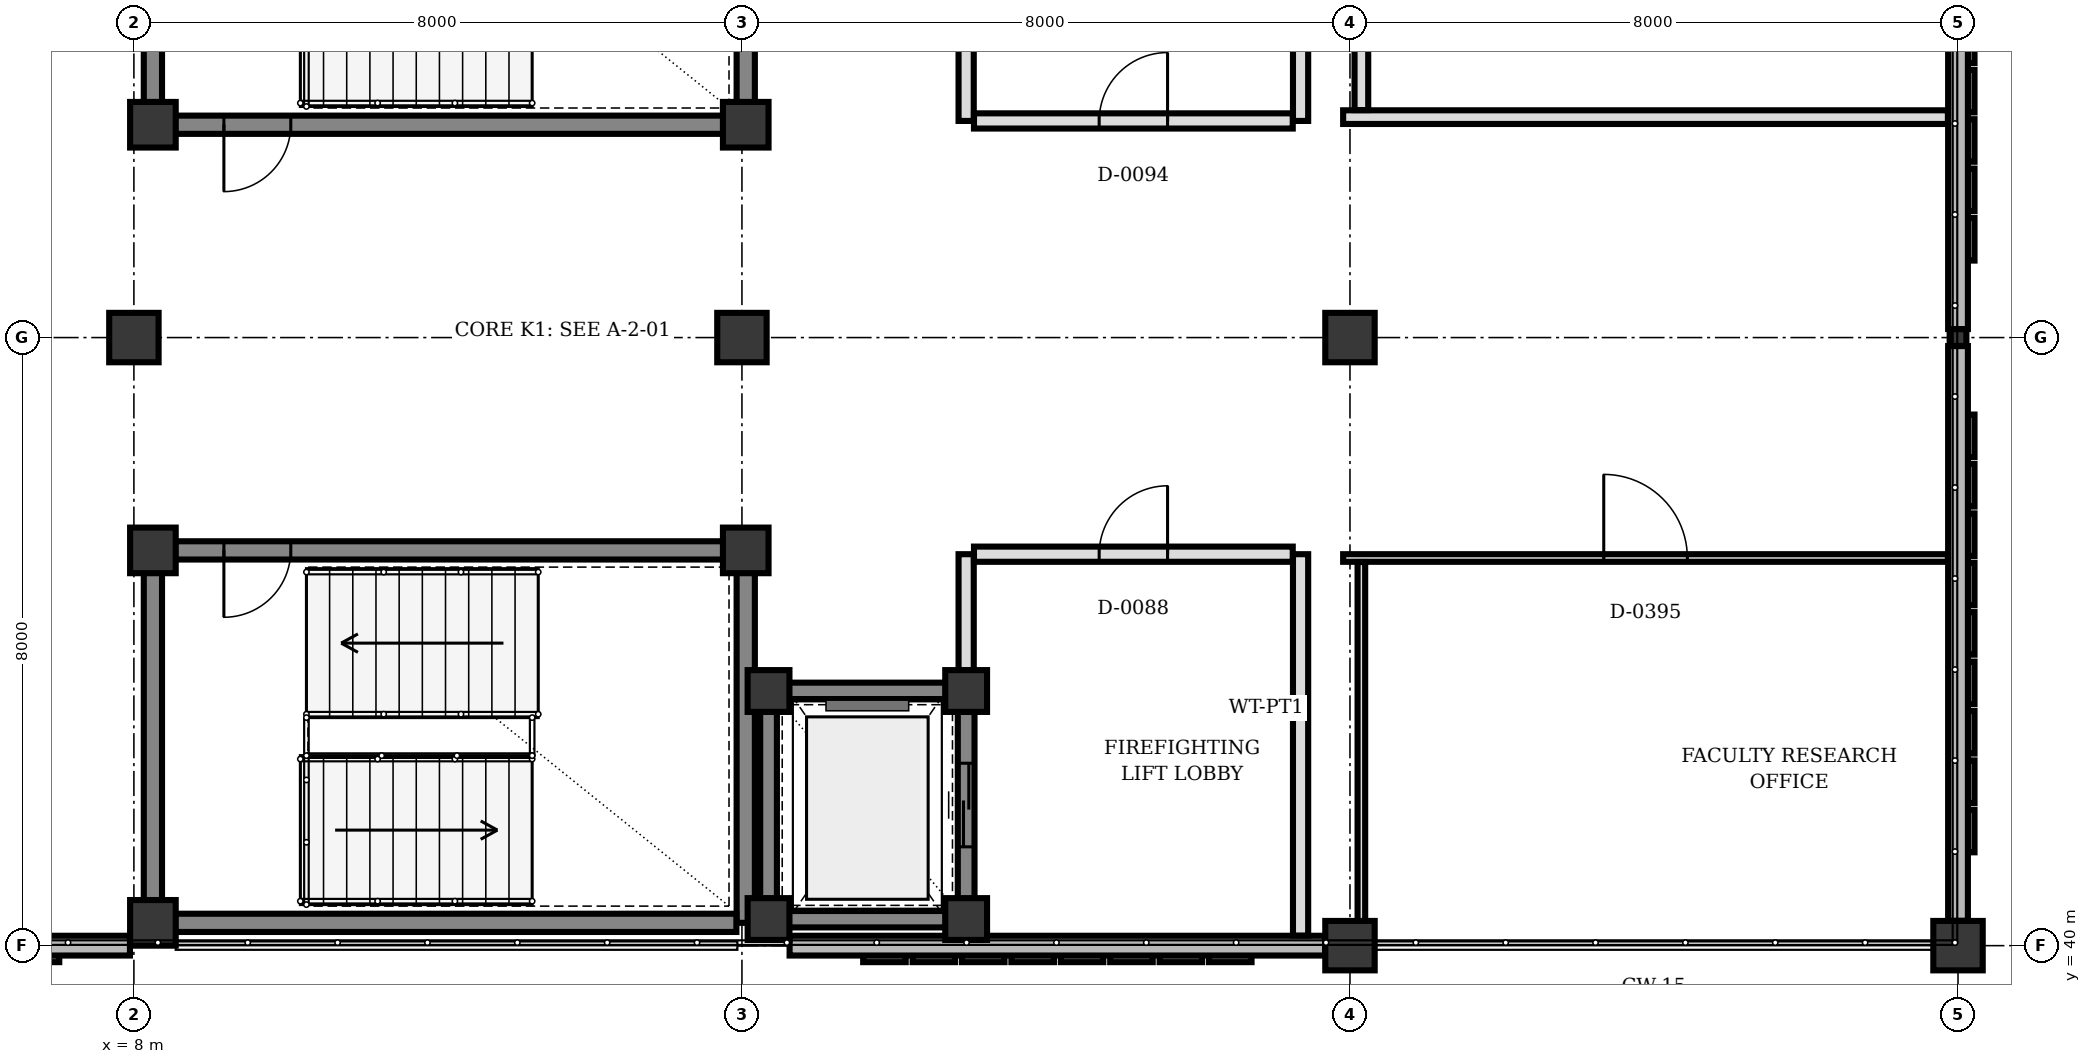
"""IFC4 building model, lengths in metres.
Left out: names, types, materials, properties, quantities, classifications, styles, units other than length and angle.
Written with IfcOpenShell. Run it as: python <this file> out.ifc"""

import sys

from ifc_helpers import new_model, si_unit, direction, frame, frame_2d, origin, origin_2d, place, context, subcontext, project, spatial, rectangle, hollow_rectangle, extrude, element, fill, save


model = new_model("IFC4")
c1 = context("Model", 3, precision=1e-05, world=origin(), true_north=direction((0.0, 1.0)))
c2 = subcontext(c1, "Body", "Model", "MODEL_VIEW")
j1 = project(units=[si_unit("LENGTHUNIT", "METRE"), si_unit("PLANEANGLEUNIT", "RADIAN")], contexts=[c1])
p1 = place(None, origin())
s1 = spatial("IfcSite", under=j1, at=p1, CompositionType="ELEMENT")
p2 = place(p1, origin())
s2 = spatial("IfcBuilding", under=s1, at=p2, CompositionType="ELEMENT")
p3 = place(p2, frame((0.0, 0.0, 12.5)))
s3 = spatial("IfcBuildingStorey", under=s2, at=p3, CompositionType="ELEMENT", Elevation=12.5)
for number, where, z_axis, x_axis in (
    (1, (8.25, 40.3, 0.0), (0.0, 0.0, 1.0), (1.0, 0.0, 0.0)),
    (2, (16.05, 45.2, 0.0), (0.0, 0.0, 1.0), (1.0, 0.0, 0.0)),
    (3, (8.25, 45.2, 0.0), (0.0, 0.0, 1.0), (1.0, 0.0, 0.0)),
    (4, (8.25, 50.8, 0.0), (0.0, 0.0, 1.0), (1.0, 0.0, 0.0)),
    (5, (16.05, 50.8, 0.0), (0.0, 0.0, 1.0), (1.0, 0.0, 0.0)),
):
    element("IfcColumn", number, at=place(p3, frame(where, z_axis=z_axis, x_axis=x_axis)), inside=s3, PredefinedType="COLUMN", context=c2, shape_type="SweptSolid", body=[
        extrude(rectangle(XDim=0.6, YDim=0.6, at=origin_2d()), origin(), (0.0, 0.0, 1.0), 4.0),
    ])
for number, where, z_axis, x_axis in (
    (6, (16.35, 40.35, 0.0), (0.0, 0.0, 1.0), (1.0, 0.0, 0.0)),
    (7, (18.95, 40.35, 0.0), (0.0, 0.0, 1.0), (1.0, 0.0, 0.0)),
    (8, (18.95, 43.35, 0.0), (0.0, 0.0, 1.0), (1.0, 0.0, 0.0)),
    (9, (16.35, 43.35, 0.0), (0.0, 0.0, 1.0), (1.0, 0.0, 0.0)),
):
    element("IfcColumn", number, at=place(p3, frame(where, z_axis=z_axis, x_axis=x_axis)), inside=s3, PredefinedType="COLUMN", context=c2, shape_type="SweptSolid", body=[
        extrude(rectangle(XDim=0.55, YDim=0.55, at=origin_2d()), origin(), (0.0, 0.0, 1.0), 4.0),
    ])
for number, where, z_axis, x_axis in (
    (10, (16.0, 48.0, 0.0), (0.0, 0.0, 1.0), (1.0, 0.0, 0.0)),
    (11, (24.0, 40.0, 0.0), (0.0, 0.0, 1.0), (1.0, 0.0, 0.0)),
    (12, (24.0, 48.0, 0.0), (0.0, 0.0, 1.0), (1.0, 0.0, 0.0)),
    (13, (32.0, 40.0, 0.0), (0.0, 0.0, 1.0), (1.0, 0.0, 0.0)),
):
    element("IfcColumn", number, at=place(p3, frame(where, z_axis=z_axis, x_axis=x_axis)), inside=s3, PredefinedType="COLUMN", context=c2, shape_type="SweptSolid", body=[
        extrude(rectangle(XDim=0.65, YDim=0.65, at=origin_2d()), origin(), (0.0, 0.0, 1.0), 4.0),
    ])
p4 = place(p3, frame((32.0, 48.0, 0.0), z_axis=(0.0, 0.0, 1.0), x_axis=(1.0, 0.0, 0.0)))
e14 = element("IfcColumn", 14, at=p4, inside=s3, PredefinedType="COLUMN", context=c2, shape_type="SweptSolid", body=[
    extrude(hollow_rectangle(XDim=0.22, YDim=0.22, WallThickness=0.01, at=origin_2d()), origin(), (0.0, 0.0, 1.0), 4.0),
])
p5 = place(p3, frame((8.0, 48.0, 0.0), z_axis=(0.0, 0.0, 1.0), x_axis=(1.0, 0.0, 0.0)))
e15 = element("IfcColumn", 15, at=p5, inside=s3, PredefinedType="COLUMN", context=c2, shape_type="SweptSolid", body=[
    extrude(rectangle(XDim=0.65, YDim=0.65, at=origin_2d()), origin(), (0.0, 0.0, 1.0), 4.0),
])
for number, where, z_axis, x_axis in (
    (16, (32.0, 55.673, 0.0), (0.0, 0.0, 1.0), (0.0, -1.0, 0.0)),
    (17, (32.0, 47.888, 0.0), (0.0, 0.0, 1.0), (0.0, -1.0, 0.0)),
):
    element("IfcWall", number, at=place(p3, frame(where, z_axis=z_axis, x_axis=x_axis)), inside=s3, PredefinedType="SOLIDWALL", context=c2, shape_type="SweptSolid", body=[
        extrude(rectangle(XDim=7.561, YDim=0.26, at=frame_2d((3.781, 0.0))), origin(), (0.0, 0.0, 1.0), 3.152),
    ])
p6 = place(p3, frame((23.673, 40.0, 0.0), z_axis=(0.0, 0.0, 1.0), x_axis=(-1.0, 0.0, 0.0)))
e18 = element("IfcWall", 18, at=p6, inside=s3, PredefinedType="SOLIDWALL", context=c2, shape_type="SweptSolid", body=[
    extrude(rectangle(XDim=7.046, YDim=0.26, at=frame_2d((3.523, 0.0))), origin(), (0.0, 0.0, 1.0), 3.55),
])
p7 = place(p3, frame((7.948, 40.0, 0.0), z_axis=(0.0, 0.0, 1.0), x_axis=(-1.0, 0.0, 0.0)))
e19 = element("IfcWall", 19, at=p7, inside=s3, PredefinedType="SOLIDWALL", context=c2, shape_type="SweptSolid", body=[
    extrude(rectangle(XDim=7.621, YDim=0.26, at=frame_2d((3.811, 0.0))), origin(), (0.0, 0.0, 1.0), 3.55),
])
p8 = place(p7, frame((1.711, 0.0, 0.9)))
e20 = element("IfcOpeningElement", 20, at=p8, cuts=e19, PredefinedType="OPENING", context=c2, shape_type="SweptSolid", body=[
    extrude(rectangle(XDim=1.15, YDim=1.25, at=frame_2d((0.575, 0.625))), frame((0.0, 0.14, 0.0), z_axis=(0.0, -1.0, 0.0), x_axis=(1.0, 0.0, 0.0)), (0.0, 0.0, 1.0), 0.28),
])
p9 = place(p3, frame((8.25, 40.592, 0.0), z_axis=(0.0, 0.0, 1.0), x_axis=(0.0, 1.0, 0.0)))
e21 = element("IfcWall", 21, at=p9, inside=s3, PredefinedType="SHEAR", context=c2, shape_type="SweptSolid", body=[
    extrude(rectangle(XDim=4.316, YDim=0.24, at=frame_2d((2.158, 0.0))), origin(), (0.0, 0.0, 1.0), 3.74),
])
p10 = place(p3, frame((16.05, 44.908, 0.0), z_axis=(0.0, 0.0, 1.0), x_axis=(0.0, -1.0, 0.0)))
e22 = element("IfcWall", 22, at=p10, inside=s3, PredefinedType="SHEAR", context=c2, shape_type="SweptSolid", body=[
    extrude(rectangle(XDim=4.608, YDim=0.24, at=frame_2d((2.304, 0.0))), origin(), (0.0, 0.0, 1.0), 3.74),
])
p11 = place(p3, frame((15.927, 40.3, 0.0), z_axis=(0.0, 0.0, 1.0), x_axis=(-1.0, 0.0, 0.0)))
e23 = element("IfcWall", 23, at=p11, inside=s3, PredefinedType="SHEAR", context=c2, shape_type="SweptSolid", body=[
    extrude(rectangle(XDim=7.385, YDim=0.24, at=frame_2d((3.692, 0.0))), origin(), (0.0, 0.0, 1.0), 3.74),
])
p12 = place(p3, frame((15.758, 45.2, 0.0), z_axis=(0.0, 0.0, 1.0), x_axis=(-1.0, 0.0, 0.0)))
e24 = element("IfcWall", 24, at=p12, inside=s3, PredefinedType="SHEAR", context=c2, shape_type="SweptSolid", body=[
    extrude(rectangle(XDim=7.216, YDim=0.24, at=frame_2d((3.608, 0.0))), origin(), (0.0, 0.0, 1.0), 3.74),
])
p13 = place(p12, frame((5.694, 0.0, 0.0)))
e25 = element("IfcOpeningElement", 25, at=p13, cuts=e24, PredefinedType="OPENING", context=c2, shape_type="SweptSolid", body=[
    extrude(rectangle(XDim=0.88, YDim=2.1, at=frame_2d((0.44, 1.05))), frame((0.0, 0.13, 0.0), z_axis=(0.0, -1.0, 0.0), x_axis=(1.0, 0.0, 0.0)), (0.0, 0.0, 1.0), 0.26),
])
p14 = place(p3, frame((8.25, 51.092, 0.0), z_axis=(0.0, 0.0, 1.0), x_axis=(0.0, 1.0, 0.0)))
e26 = element("IfcWall", 26, at=p14, inside=s3, PredefinedType="SHEAR", context=c2, shape_type="SweptSolid", body=[
    extrude(rectangle(XDim=4.316, YDim=0.24, at=frame_2d((2.158, 0.0))), origin(), (0.0, 0.0, 1.0), 3.74),
])
p15 = place(p3, frame((16.05, 55.7, 0.0), z_axis=(0.0, 0.0, 1.0), x_axis=(0.0, -1.0, 0.0)))
e27 = element("IfcWall", 27, at=p15, inside=s3, PredefinedType="SHEAR", context=c2, shape_type="SweptSolid", body=[
    extrude(rectangle(XDim=4.608, YDim=0.24, at=frame_2d((2.304, 0.0))), origin(), (0.0, 0.0, 1.0), 3.74),
])
p16 = place(p3, frame((15.758, 50.8, 0.0), z_axis=(0.0, 0.0, 1.0), x_axis=(-1.0, 0.0, 0.0)))
e28 = element("IfcWall", 28, at=p16, inside=s3, PredefinedType="SHEAR", context=c2, shape_type="SweptSolid", body=[
    extrude(rectangle(XDim=7.216, YDim=0.24, at=frame_2d((3.608, 0.0))), origin(), (0.0, 0.0, 1.0), 3.74),
])
p17 = place(p16, frame((5.694, 0.0, 0.0)))
e29 = element("IfcOpeningElement", 29, at=p17, cuts=e28, PredefinedType="OPENING", context=c2, shape_type="SweptSolid", body=[
    extrude(rectangle(XDim=0.88, YDim=2.1, at=frame_2d((0.44, 1.05))), frame((0.0, 0.13, 0.0), z_axis=(0.0, -1.0, 0.0), x_axis=(1.0, 0.0, 0.0)), (0.0, 0.0, 1.0), 0.26),
])
p18 = place(p3, frame((16.617, 40.35, 0.0), z_axis=(0.0, 0.0, 1.0), x_axis=(1.0, 0.0, 0.0)))
e30 = element("IfcWall", 30, at=p18, inside=s3, PredefinedType="SHEAR", context=c2, shape_type="SweptSolid", body=[
    extrude(rectangle(XDim=2.066, YDim=0.22, at=frame_2d((1.033, 0.0))), origin(), (0.0, 0.0, 1.0), 3.74),
])
p19 = place(p3, frame((18.95, 40.617, 0.0), z_axis=(0.0, 0.0, 1.0), x_axis=(0.0, 1.0, 0.0)))
e31 = element("IfcWall", 31, at=p19, inside=s3, PredefinedType="SHEAR", context=c2, shape_type="SweptSolid", body=[
    extrude(rectangle(XDim=2.466, YDim=0.22, at=frame_2d((1.233, 0.0))), origin(), (0.0, 0.0, 1.0), 3.74),
])
p20 = place(p19, frame((0.683, 0.0, 0.0)))
e32 = element("IfcOpeningElement", 32, at=p20, cuts=e31, PredefinedType="OPENING", context=c2, shape_type="SweptSolid", body=[
    extrude(rectangle(XDim=1.1, YDim=2.15, at=frame_2d((0.55, 1.075))), frame((0.0, 0.12, 0.0), z_axis=(0.0, -1.0, 0.0), x_axis=(1.0, 0.0, 0.0)), (0.0, 0.0, 1.0), 0.24),
])
p21 = place(p3, frame((18.683, 43.35, 0.0), z_axis=(0.0, 0.0, 1.0), x_axis=(-1.0, 0.0, 0.0)))
e33 = element("IfcWall", 33, at=p21, inside=s3, PredefinedType="SHEAR", context=c2, shape_type="SweptSolid", body=[
    extrude(rectangle(XDim=2.066, YDim=0.22, at=frame_2d((1.033, 0.0))), origin(), (0.0, 0.0, 1.0), 3.74),
])
p22 = place(p3, frame((16.35, 43.083, 0.0), z_axis=(0.0, 0.0, 1.0), x_axis=(0.0, -1.0, 0.0)))
e34 = element("IfcWall", 34, at=p22, inside=s3, PredefinedType="SHEAR", context=c2, shape_type="SweptSolid", body=[
    extrude(rectangle(XDim=2.466, YDim=0.22, at=frame_2d((1.233, 0.0))), origin(), (0.0, 0.0, 1.0), 3.74),
])
p23 = place(p3, frame((18.95, 43.617, 0.0), z_axis=(0.0, 0.0, 1.0), x_axis=(0.0, 1.0, 0.0)))
e35 = element("IfcWall", 35, at=p23, inside=s3, PredefinedType="PARTITIONING", context=c2, shape_type="SweptSolid", body=[
    extrude(rectangle(XDim=1.533, YDim=0.2, at=frame_2d((0.767, 0.0))), origin(), (0.0, 0.0, 1.0), 3.7),
])
p24 = place(p3, frame((23.35, 40.133, 0.0), z_axis=(0.0, 0.0, 1.0), x_axis=(0.0, 1.0, 0.0)))
e36 = element("IfcWall", 36, at=p24, inside=s3, PredefinedType="PARTITIONING", context=c2, shape_type="SweptSolid", body=[
    extrude(rectangle(XDim=5.017, YDim=0.2, at=frame_2d((2.508, 0.0))), origin(), (0.0, 0.0, 1.0), 3.7),
])
p25 = place(p3, frame((19.053, 45.15, 0.0), z_axis=(0.0, 0.0, 1.0), x_axis=(1.0, 0.0, 0.0)))
e37 = element("IfcWall", 37, at=p25, inside=s3, PredefinedType="PARTITIONING", context=c2, shape_type="SweptSolid", body=[
    extrude(rectangle(XDim=4.194, YDim=0.2, at=frame_2d((2.097, 0.0))), origin(), (0.0, 0.0, 1.0), 3.7),
])
p26 = place(p25, frame((1.647, 0.0, 0.0)))
e38 = element("IfcOpeningElement", 38, at=p26, cuts=e37, PredefinedType="OPENING", context=c2, shape_type="SweptSolid", body=[
    extrude(rectangle(XDim=0.9, YDim=2.2, at=frame_2d((0.45, 1.1))), frame((0.0, 0.11, 0.0), z_axis=(0.0, -1.0, 0.0), x_axis=(1.0, 0.0, 0.0)), (0.0, 0.0, 1.0), 0.22),
])
p27 = place(p3, frame((18.95, 50.85, 0.0), z_axis=(0.0, 0.0, 1.0), x_axis=(0.0, 1.0, 0.0)))
e39 = element("IfcWall", 39, at=p27, inside=s3, PredefinedType="PARTITIONING", context=c2, shape_type="SweptSolid", body=[
    extrude(rectangle(XDim=1.533, YDim=0.2, at=frame_2d((0.767, 0.0))), origin(), (0.0, 0.0, 1.0), 3.7),
])
p28 = place(p3, frame((23.35, 50.85, 0.0), z_axis=(0.0, 0.0, 1.0), x_axis=(0.0, 1.0, 0.0)))
e40 = element("IfcWall", 40, at=p28, inside=s3, PredefinedType="PARTITIONING", context=c2, shape_type="SweptSolid", body=[
    extrude(rectangle(XDim=4.8, YDim=0.2, at=frame_2d((2.4, 0.0))), origin(), (0.0, 0.0, 1.0), 3.7),
])
p29 = place(p3, frame((19.053, 50.85, 0.0), z_axis=(0.0, 0.0, 1.0), x_axis=(1.0, 0.0, 0.0)))
e41 = element("IfcWall", 41, at=p29, inside=s3, PredefinedType="PARTITIONING", context=c2, shape_type="SweptSolid", body=[
    extrude(rectangle(XDim=4.194, YDim=0.2, at=frame_2d((2.097, 0.0))), origin(), (0.0, 0.0, 1.0), 3.7),
])
p30 = place(p29, frame((1.647, 0.0, 0.0)))
e42 = element("IfcOpeningElement", 42, at=p30, cuts=e41, PredefinedType="OPENING", context=c2, shape_type="SweptSolid", body=[
    extrude(rectangle(XDim=0.9, YDim=2.2, at=frame_2d((0.45, 1.1))), frame((0.0, 0.11, 0.0), z_axis=(0.0, -1.0, 0.0), x_axis=(1.0, 0.0, 0.0)), (0.0, 0.0, 1.0), 0.22),
])
p31 = place(p3, frame((23.91, 45.1, 0.0), z_axis=(0.0, 0.0, 1.0), x_axis=(1.0, 0.0, 0.0)))
e43 = element("IfcWall", 43, at=p31, inside=s3, PredefinedType="PARTITIONING", context=c2, shape_type="SweptSolid", body=[
    extrude(rectangle(XDim=7.957, YDim=0.1, at=frame_2d((3.979, 0.0))), origin(), (0.0, 0.0, 1.0), 3.152),
])
p32 = place(p31, frame((3.429, 0.0, 0.0)))
e44 = element("IfcOpeningElement", 44, at=p32, cuts=e43, PredefinedType="OPENING", context=c2, shape_type="SweptSolid", body=[
    extrude(rectangle(XDim=1.1, YDim=2.28, at=frame_2d((0.55, 1.14))), frame((0.0, 0.06, 0.0), z_axis=(0.0, -1.0, 0.0), x_axis=(1.0, 0.0, 0.0)), (0.0, 0.0, 1.0), 0.12),
])
p33 = place(p3, frame((24.15, 40.317, 0.0), z_axis=(0.0, 0.0, 1.0), x_axis=(0.0, 1.0, 0.0)))
e45 = element("IfcWall", 45, at=p33, inside=s3, PredefinedType="PARTITIONING", context=c2, shape_type="SweptSolid", body=[
    extrude(rectangle(XDim=4.73, YDim=0.1, at=frame_2d((2.365, 0.0))), origin(), (0.0, 0.0, 1.0), 3.002),
])
p34 = place(p3, frame((31.867, 50.9, 0.0), z_axis=(0.0, 0.0, 1.0), x_axis=(-1.0, 0.0, 0.0)))
e46 = element("IfcWall", 46, at=p34, inside=s3, PredefinedType="PARTITIONING", context=c2, shape_type="SweptSolid", body=[
    extrude(rectangle(XDim=7.957, YDim=0.18, at=frame_2d((3.979, 0.0))), origin(), (0.0, 0.0, 1.0), 3.152),
])
p35 = place(p3, frame((24.15, 50.993, 0.0), z_axis=(0.0, 0.0, 1.0), x_axis=(0.0, 1.0, 0.0)))
e47 = element("IfcWall", 47, at=p35, inside=s3, PredefinedType="PARTITIONING", context=c2, shape_type="SweptSolid", body=[
    extrude(rectangle(XDim=4.564, YDim=0.18, at=frame_2d((2.282, 0.0))), origin(), (0.0, 0.0, 1.0), 3.152),
])
p36 = place(p13, origin())
e48 = element("IfcDoor", 48, at=p36, inside=s3, OperationType="SINGLE_SWING_RIGHT", PredefinedType="DOOR", context=c2, shape_type="SweptSolid", body=[
    extrude(rectangle(XDim=0.88, YDim=2.1, at=frame_2d((0.44, 1.05))), frame((0.0, 0.025, 0.0), z_axis=(0.0, -1.0, 0.0), x_axis=(1.0, 0.0, 0.0)), (0.0, 0.0, 1.0), 0.05),
])
fill(e25, e48)
p37 = place(p17, origin())
e49 = element("IfcDoor", 49, at=p37, inside=s3, OperationType="SINGLE_SWING_RIGHT", PredefinedType="DOOR", context=c2, shape_type="SweptSolid", body=[
    extrude(rectangle(XDim=0.88, YDim=2.1, at=frame_2d((0.44, 1.05))), frame((0.0, 0.025, 0.0), z_axis=(0.0, -1.0, 0.0), x_axis=(1.0, 0.0, 0.0)), (0.0, 0.0, 1.0), 0.05),
])
fill(e29, e49)
p38 = place(p20, origin())
e50 = element("IfcDoor", 50, at=p38, inside=s3, OperationType="DOUBLE_DOOR_SLIDING", PredefinedType="DOOR", context=c2, shape_type="SweptSolid", body=[
    extrude(rectangle(XDim=1.1, YDim=2.15, at=frame_2d((0.55, 1.075))), frame((0.0, 0.025, 0.0), z_axis=(0.0, -1.0, 0.0), x_axis=(1.0, 0.0, 0.0)), (0.0, 0.0, 1.0), 0.05),
])
fill(e32, e50)
p39 = place(p26, origin())
e51 = element("IfcDoor", 51, at=p39, inside=s3, OperationType="SINGLE_SWING_RIGHT", PredefinedType="DOOR", context=c2, shape_type="SweptSolid", body=[
    extrude(rectangle(XDim=0.9, YDim=2.2, at=frame_2d((0.45, 1.1))), frame((0.0, 0.025, 0.0), z_axis=(0.0, -1.0, 0.0), x_axis=(1.0, 0.0, 0.0)), (0.0, 0.0, 1.0), 0.05),
])
fill(e38, e51)
p40 = place(p30, origin())
e52 = element("IfcDoor", 52, at=p40, inside=s3, OperationType="SINGLE_SWING_RIGHT", PredefinedType="DOOR", context=c2, shape_type="SweptSolid", body=[
    extrude(rectangle(XDim=0.9, YDim=2.2, at=frame_2d((0.45, 1.1))), frame((0.0, 0.025, 0.0), z_axis=(0.0, -1.0, 0.0), x_axis=(1.0, 0.0, 0.0)), (0.0, 0.0, 1.0), 0.05),
])
fill(e42, e52)
p41 = place(p32, origin())
e53 = element("IfcDoor", 53, at=p41, inside=s3, OperationType="SINGLE_SWING_LEFT", PredefinedType="DOOR", context=c2, shape_type="SweptSolid", body=[
    extrude(rectangle(XDim=1.1, YDim=2.28, at=frame_2d((0.55, 1.14))), frame((0.0, 0.025, 0.0), z_axis=(0.0, -1.0, 0.0), x_axis=(1.0, 0.0, 0.0)), (0.0, 0.0, 1.0), 0.05),
])
fill(e44, e53)
save(model, sys.argv[1])
